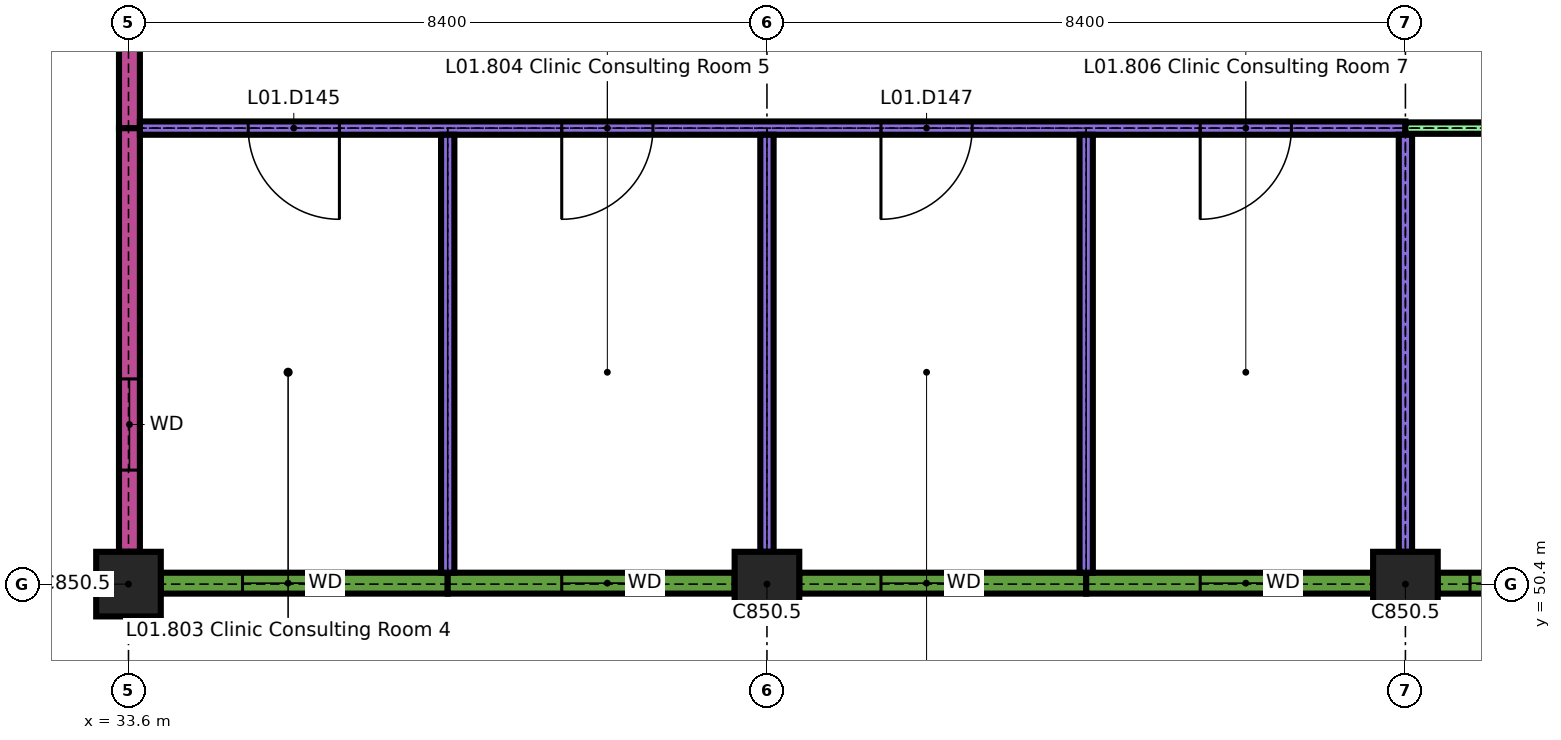
"""IFC4 building model, lengths in metres.
Left out: names, types, materials, properties, quantities, classifications, styles, units other than length and angle.
Written with IfcOpenShell. Run it as: python <this file> out.ifc"""

import sys

from ifc_helpers import new_model, si_unit, direction, frame, frame_2d, origin, origin_2d, place, context, subcontext, project, spatial, rectangle, extrude, element, fill, save


model = new_model("IFC4")
c1 = context("Model", 3, precision=1e-05, world=origin(), true_north=direction((0.0, 1.0)))
c2 = subcontext(c1, "Body", "Model", "MODEL_VIEW")
j1 = project(units=[si_unit("LENGTHUNIT", "METRE"), si_unit("PLANEANGLEUNIT", "RADIAN")], contexts=[c1])
p1 = place(None, origin())
s1 = spatial("IfcSite", under=j1, at=p1, CompositionType="ELEMENT")
p2 = place(p1, origin())
s2 = spatial("IfcBuilding", under=s1, at=p2, CompositionType="ELEMENT")
p3 = place(p2, frame((0.0, 0.0, 4.5)))
s3 = spatial("IfcBuildingStorey", under=s2, at=p3, CompositionType="ELEMENT", Elevation=4.5)
for number, where, z_axis, x_axis in (
    (1, (33.6, 50.4, 0.0), (0.0, 0.0, 1.0), (1.0, 0.0, 0.0)),
    (2, (42.0, 50.4, 0.0), (0.0, 0.0, 1.0), (1.0, 0.0, 0.0)),
    (3, (50.4, 50.4, 0.0), (0.0, 0.0, 1.0), (1.0, 0.0, 0.0)),
):
    element("IfcColumn", number, at=place(p3, frame(where, z_axis=z_axis, x_axis=x_axis)), inside=s3, PredefinedType="COLUMN", context=c2, shape_type="SweptSolid", body=[
        extrude(rectangle(XDim=0.85, YDim=0.85, at=origin_2d()), origin(), (0.0, 0.0, 1.0), 4.358),
    ])
p4 = place(p3, frame((34.025, 50.413, 0.0), z_axis=(0.0, 0.0, 1.0), x_axis=(1.0, 0.0, 0.0)))
e4 = element("IfcWall", 4, at=p4, inside=s3, PredefinedType="SOLIDWALL", context=c2, shape_type="SweptSolid", body=[
    extrude(rectangle(XDim=3.775, YDim=0.275, at=frame_2d((1.888, 0.0))), origin(), (0.0, 0.0, 1.0), 3.3),
])
p5 = place(p4, frame((1.075, 0.0, 0.9)))
e5 = element("IfcOpeningElement", 5, at=p5, cuts=e4, PredefinedType="OPENING", context=c2, shape_type="SweptSolid", body=[
    extrude(rectangle(XDim=1.2, YDim=1.5, at=frame_2d((0.6, 0.75))), frame((0.0, 0.147, 0.0), z_axis=(0.0, -1.0, 0.0), x_axis=(1.0, 0.0, 0.0)), (0.0, 0.0, 1.0), 0.295),
])
p6 = place(p3, frame((37.8, 50.413, 0.0), z_axis=(0.0, 0.0, 1.0), x_axis=(1.0, 0.0, 0.0)))
e6 = element("IfcWall", 6, at=p6, inside=s3, PredefinedType="SOLIDWALL", context=c2, shape_type="SweptSolid", body=[
    extrude(rectangle(XDim=3.775, YDim=0.275, at=frame_2d((1.887, 0.0))), origin(), (0.0, 0.0, 1.0), 3.3),
])
p7 = place(p6, frame((1.5, 0.0, 0.9)))
e7 = element("IfcOpeningElement", 7, at=p7, cuts=e6, PredefinedType="OPENING", context=c2, shape_type="SweptSolid", body=[
    extrude(rectangle(XDim=1.2, YDim=1.5, at=frame_2d((0.6, 0.75))), frame((0.0, 0.147, 0.0), z_axis=(0.0, -1.0, 0.0), x_axis=(1.0, 0.0, 0.0)), (0.0, 0.0, 1.0), 0.295),
])
p8 = place(p3, frame((42.425, 50.413, 0.0), z_axis=(0.0, 0.0, 1.0), x_axis=(1.0, 0.0, 0.0)))
e8 = element("IfcWall", 8, at=p8, inside=s3, PredefinedType="SOLIDWALL", context=c2, shape_type="SweptSolid", body=[
    extrude(rectangle(XDim=3.775, YDim=0.275, at=frame_2d((1.887, 0.0))), origin(), (0.0, 0.0, 1.0), 3.3),
])
p9 = place(p8, frame((1.075, 0.0, 0.9)))
e9 = element("IfcOpeningElement", 9, at=p9, cuts=e8, PredefinedType="OPENING", context=c2, shape_type="SweptSolid", body=[
    extrude(rectangle(XDim=1.2, YDim=1.5, at=frame_2d((0.6, 0.75))), frame((0.0, 0.147, 0.0), z_axis=(0.0, -1.0, 0.0), x_axis=(1.0, 0.0, 0.0)), (0.0, 0.0, 1.0), 0.295),
])
p10 = place(p3, frame((46.2, 50.413, 0.0), z_axis=(0.0, 0.0, 1.0), x_axis=(1.0, 0.0, 0.0)))
e10 = element("IfcWall", 10, at=p10, inside=s3, PredefinedType="SOLIDWALL", context=c2, shape_type="SweptSolid", body=[
    extrude(rectangle(XDim=3.775, YDim=0.275, at=frame_2d((1.888, 0.0))), origin(), (0.0, 0.0, 1.0), 3.3),
])
p11 = place(p10, frame((1.5, 0.0, 0.9)))
e11 = element("IfcOpeningElement", 11, at=p11, cuts=e10, PredefinedType="OPENING", context=c2, shape_type="SweptSolid", body=[
    extrude(rectangle(XDim=1.2, YDim=1.5, at=frame_2d((0.6, 0.75))), frame((0.0, 0.147, 0.0), z_axis=(0.0, -1.0, 0.0), x_axis=(1.0, 0.0, 0.0)), (0.0, 0.0, 1.0), 0.295),
])
p12 = place(p3, frame((50.825, 50.413, 0.0), z_axis=(0.0, 0.0, 1.0), x_axis=(1.0, 0.0, 0.0)))
e12 = element("IfcWall", 12, at=p12, inside=s3, PredefinedType="SOLIDWALL", context=c2, shape_type="SweptSolid", body=[
    extrude(rectangle(XDim=2.425, YDim=0.275, at=frame_2d((1.212, 0.0))), origin(), (0.0, 0.0, 1.0), 3.3),
])
p13 = place(p12, frame((0.425, 0.0, 0.9)))
e13 = element("IfcOpeningElement", 13, at=p13, cuts=e12, PredefinedType="OPENING", context=c2, shape_type="SweptSolid", body=[
    extrude(rectangle(XDim=1.2, YDim=1.5, at=frame_2d((0.6, 0.75))), frame((0.0, 0.147, 0.0), z_axis=(0.0, -1.0, 0.0), x_axis=(1.0, 0.0, 0.0)), (0.0, 0.0, 1.0), 0.295),
])
p14 = place(p3, frame((33.613, 50.825, 0.0), z_axis=(0.0, 0.0, 1.0), x_axis=(0.0, 1.0, 0.0)))
e14 = element("IfcWall", 14, at=p14, inside=s3, PredefinedType="SOLIDWALL", context=c2, shape_type="SweptSolid", body=[
    extrude(rectangle(XDim=5.575, YDim=0.275, at=frame_2d((2.788, 0.0))), origin(), (0.0, 0.0, 1.0), 5.0),
])
p15 = place(p14, frame((1.075, 0.0, 0.9)))
e15 = element("IfcOpeningElement", 15, at=p15, cuts=e14, PredefinedType="OPENING", context=c2, shape_type="SweptSolid", body=[
    extrude(rectangle(XDim=1.2, YDim=1.5, at=frame_2d((0.6, 0.75))), frame((0.0, 0.147, 0.0), z_axis=(0.0, -1.0, 0.0), x_axis=(1.0, 0.0, 0.0)), (0.0, 0.0, 1.0), 0.295),
])
p16 = place(p3, frame((33.613, 56.4, 0.0), z_axis=(0.0, 0.0, 1.0), x_axis=(0.0, 1.0, 0.0)))
e16 = element("IfcWall", 16, at=p16, inside=s3, PredefinedType="SOLIDWALL", context=c2, shape_type="SweptSolid", body=[
    extrude(rectangle(XDim=1.975, YDim=0.275, at=frame_2d((0.988, 0.0))), origin(), (0.0, 0.0, 1.0), 5.0),
])
p17 = place(p3, frame((33.75, 56.4, 0.0), z_axis=(0.0, 0.0, 1.0), x_axis=(1.0, 0.0, 0.0)))
e17 = element("IfcWall", 17, at=p17, inside=s3, PredefinedType="PARTITIONING", context=c2, shape_type="SweptSolid", body=[
    extrude(rectangle(XDim=16.65, YDim=0.175, at=frame_2d((8.325, 0.0))), origin(), (0.0, 0.0, 1.0), 3.3),
])
p18 = place(p17, frame((1.425, 0.0, 0.0)))
e18 = element("IfcOpeningElement", 18, at=p18, cuts=e17, PredefinedType="OPENING", context=c2, shape_type="SweptSolid", body=[
    extrude(rectangle(XDim=1.2, YDim=2.1, at=frame_2d((0.6, 1.05))), frame((0.0, 0.097, 0.0), z_axis=(0.0, -1.0, 0.0), x_axis=(1.0, 0.0, 0.0)), (0.0, 0.0, 1.0), 0.195),
])
p19 = place(p17, frame((5.55, 0.0, 0.0)))
e19 = element("IfcOpeningElement", 19, at=p19, cuts=e17, PredefinedType="OPENING", context=c2, shape_type="SweptSolid", body=[
    extrude(rectangle(XDim=1.2, YDim=2.1, at=frame_2d((0.6, 1.05))), frame((0.0, 0.097, 0.0), z_axis=(0.0, -1.0, 0.0), x_axis=(1.0, 0.0, 0.0)), (0.0, 0.0, 1.0), 0.195),
])
p20 = place(p17, frame((9.75, 0.0, 0.0)))
e20 = element("IfcOpeningElement", 20, at=p20, cuts=e17, PredefinedType="OPENING", context=c2, shape_type="SweptSolid", body=[
    extrude(rectangle(XDim=1.2, YDim=2.1, at=frame_2d((0.6, 1.05))), frame((0.0, 0.097, 0.0), z_axis=(0.0, -1.0, 0.0), x_axis=(1.0, 0.0, 0.0)), (0.0, 0.0, 1.0), 0.195),
])
p21 = place(p17, frame((13.95, 0.0, 0.0)))
e21 = element("IfcOpeningElement", 21, at=p21, cuts=e17, PredefinedType="OPENING", context=c2, shape_type="SweptSolid", body=[
    extrude(rectangle(XDim=1.2, YDim=2.1, at=frame_2d((0.6, 1.05))), frame((0.0, 0.097, 0.0), z_axis=(0.0, -1.0, 0.0), x_axis=(1.0, 0.0, 0.0)), (0.0, 0.0, 1.0), 0.195),
])
p22 = place(p3, frame((50.4, 56.4, 0.0), z_axis=(0.0, 0.0, 1.0), x_axis=(1.0, 0.0, 0.0)))
e22 = element("IfcWall", 22, at=p22, inside=s3, PredefinedType="PARTITIONING", context=c2, shape_type="SweptSolid", body=[
    extrude(rectangle(XDim=8.4, YDim=0.15, at=frame_2d((4.2, 0.0))), origin(), (0.0, 0.0, 1.0), 3.3),
])
p23 = place(p22, frame((3.0, 0.0, 0.0)))
e23 = element("IfcOpeningElement", 23, at=p23, cuts=e22, PredefinedType="OPENING", context=c2, shape_type="SweptSolid", body=[
    extrude(rectangle(XDim=2.4, YDim=2.4, at=frame_2d((1.2, 1.2))), frame((0.0, 0.085, 0.0), z_axis=(0.0, -1.0, 0.0), x_axis=(1.0, 0.0, 0.0)), (0.0, 0.0, 1.0), 0.17),
])
p24 = place(p3, frame((37.8, 50.55, 0.0), z_axis=(0.0, 0.0, 1.0), x_axis=(0.0, 1.0, 0.0)))
e24 = element("IfcWall", 24, at=p24, inside=s3, PredefinedType="PARTITIONING", context=c2, shape_type="SweptSolid", body=[
    extrude(rectangle(XDim=5.762, YDim=0.175, at=frame_2d((2.881, 0.0))), origin(), (0.0, 0.0, 1.0), 3.3),
])
p25 = place(p3, frame((42.0, 50.825, 0.0), z_axis=(0.0, 0.0, 1.0), x_axis=(0.0, 1.0, 0.0)))
e25 = element("IfcWall", 25, at=p25, inside=s3, PredefinedType="PARTITIONING", context=c2, shape_type="SweptSolid", body=[
    extrude(rectangle(XDim=5.488, YDim=0.175, at=frame_2d((2.744, 0.0))), origin(), (0.0, 0.0, 1.0), 3.3),
])
p26 = place(p3, frame((46.2, 50.55, 0.0), z_axis=(0.0, 0.0, 1.0), x_axis=(0.0, 1.0, 0.0)))
e26 = element("IfcWall", 26, at=p26, inside=s3, PredefinedType="PARTITIONING", context=c2, shape_type="SweptSolid", body=[
    extrude(rectangle(XDim=5.762, YDim=0.175, at=frame_2d((2.881, 0.0))), origin(), (0.0, 0.0, 1.0), 3.3),
])
p27 = place(p3, frame((50.4, 50.825, 0.0), z_axis=(0.0, 0.0, 1.0), x_axis=(0.0, 1.0, 0.0)))
e27 = element("IfcWall", 27, at=p27, inside=s3, PredefinedType="PARTITIONING", context=c2, shape_type="SweptSolid", body=[
    extrude(rectangle(XDim=5.488, YDim=0.175, at=frame_2d((2.744, 0.0))), origin(), (0.0, 0.0, 1.0), 3.3),
])
p28 = place(p5, origin())
e28 = element("IfcWindow", 28, at=p28, inside=s3, PartitioningType="SINGLE_PANEL", PredefinedType="WINDOW", context=c2, shape_type="SweptSolid", body=[
    extrude(rectangle(XDim=1.2, YDim=1.5, at=frame_2d((0.6, 0.75))), frame((0.0, 0.03, 0.0), z_axis=(0.0, -1.0, 0.0), x_axis=(1.0, 0.0, 0.0)), (0.0, 0.0, 1.0), 0.06),
])
fill(e5, e28)
p29 = place(p7, origin())
e29 = element("IfcWindow", 29, at=p29, inside=s3, PartitioningType="SINGLE_PANEL", PredefinedType="WINDOW", context=c2, shape_type="SweptSolid", body=[
    extrude(rectangle(XDim=1.2, YDim=1.5, at=frame_2d((0.6, 0.75))), frame((0.0, 0.03, 0.0), z_axis=(0.0, -1.0, 0.0), x_axis=(1.0, 0.0, 0.0)), (0.0, 0.0, 1.0), 0.06),
])
fill(e7, e29)
p30 = place(p9, origin())
e30 = element("IfcWindow", 30, at=p30, inside=s3, PartitioningType="SINGLE_PANEL", PredefinedType="WINDOW", context=c2, shape_type="SweptSolid", body=[
    extrude(rectangle(XDim=1.2, YDim=1.5, at=frame_2d((0.6, 0.75))), frame((0.0, 0.03, 0.0), z_axis=(0.0, -1.0, 0.0), x_axis=(1.0, 0.0, 0.0)), (0.0, 0.0, 1.0), 0.06),
])
fill(e9, e30)
p31 = place(p11, origin())
e31 = element("IfcWindow", 31, at=p31, inside=s3, PartitioningType="SINGLE_PANEL", PredefinedType="WINDOW", context=c2, shape_type="SweptSolid", body=[
    extrude(rectangle(XDim=1.2, YDim=1.5, at=frame_2d((0.6, 0.75))), frame((0.0, 0.03, 0.0), z_axis=(0.0, -1.0, 0.0), x_axis=(1.0, 0.0, 0.0)), (0.0, 0.0, 1.0), 0.06),
])
fill(e11, e31)
p32 = place(p13, origin())
e32 = element("IfcWindow", 32, at=p32, inside=s3, PartitioningType="SINGLE_PANEL", PredefinedType="WINDOW", context=c2, shape_type="SweptSolid", body=[
    extrude(rectangle(XDim=1.2, YDim=1.5, at=frame_2d((0.6, 0.75))), frame((0.0, 0.03, 0.0), z_axis=(0.0, -1.0, 0.0), x_axis=(1.0, 0.0, 0.0)), (0.0, 0.0, 1.0), 0.06),
])
fill(e13, e32)
p33 = place(p15, origin())
e33 = element("IfcWindow", 33, at=p33, inside=s3, PartitioningType="SINGLE_PANEL", PredefinedType="WINDOW", context=c2, shape_type="SweptSolid", body=[
    extrude(rectangle(XDim=1.2, YDim=1.5, at=frame_2d((0.6, 0.75))), frame((0.0, 0.03, 0.0), z_axis=(0.0, -1.0, 0.0), x_axis=(1.0, 0.0, 0.0)), (0.0, 0.0, 1.0), 0.06),
])
fill(e15, e33)
p34 = place(p18, origin())
e34 = element("IfcDoor", 34, at=p34, inside=s3, OperationType="SINGLE_SWING_RIGHT", PredefinedType="DOOR", context=c2, shape_type="SweptSolid", body=[
    extrude(rectangle(XDim=1.2, YDim=2.1, at=frame_2d((0.6, 1.05))), frame((0.0, 0.035, 0.0), z_axis=(0.0, -1.0, 0.0), x_axis=(1.0, 0.0, 0.0)), (0.0, 0.0, 1.0), 0.07),
])
fill(e18, e34)
p35 = place(p19, origin())
e35 = element("IfcDoor", 35, at=p35, inside=s3, OperationType="SINGLE_SWING_LEFT", PredefinedType="DOOR", context=c2, shape_type="SweptSolid", body=[
    extrude(rectangle(XDim=1.2, YDim=2.1, at=frame_2d((0.6, 1.05))), frame((0.0, 0.035, 0.0), z_axis=(0.0, -1.0, 0.0), x_axis=(1.0, 0.0, 0.0)), (0.0, 0.0, 1.0), 0.07),
])
fill(e19, e35)
p36 = place(p20, origin())
e36 = element("IfcDoor", 36, at=p36, inside=s3, OperationType="SINGLE_SWING_LEFT", PredefinedType="DOOR", context=c2, shape_type="SweptSolid", body=[
    extrude(rectangle(XDim=1.2, YDim=2.1, at=frame_2d((0.6, 1.05))), frame((0.0, 0.035, 0.0), z_axis=(0.0, -1.0, 0.0), x_axis=(1.0, 0.0, 0.0)), (0.0, 0.0, 1.0), 0.07),
])
fill(e20, e36)
p37 = place(p21, origin())
e37 = element("IfcDoor", 37, at=p37, inside=s3, OperationType="SINGLE_SWING_LEFT", PredefinedType="DOOR", context=c2, shape_type="SweptSolid", body=[
    extrude(rectangle(XDim=1.2, YDim=2.1, at=frame_2d((0.6, 1.05))), frame((0.0, 0.035, 0.0), z_axis=(0.0, -1.0, 0.0), x_axis=(1.0, 0.0, 0.0)), (0.0, 0.0, 1.0), 0.07),
])
fill(e21, e37)
save(model, sys.argv[1])
